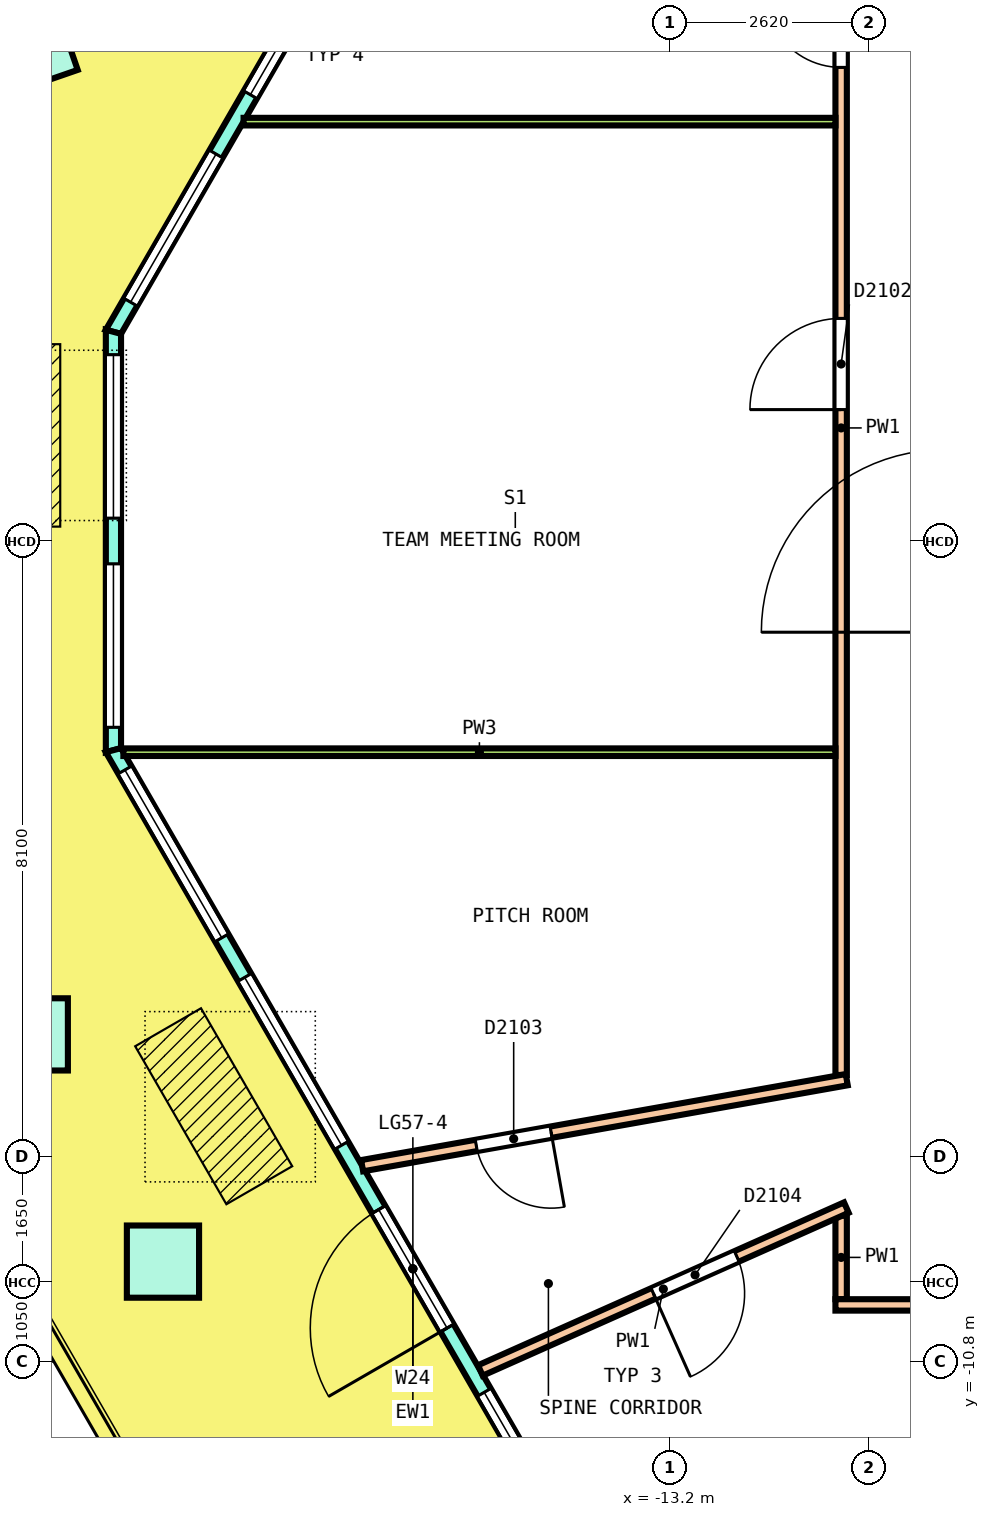
"""IFC4 building model, lengths in metres.
Left out: names, types, materials, properties, quantities, classifications, styles, units other than length and angle.
Written with IfcOpenShell. Run it as: python <this file> out.ifc"""

import sys

from ifc_helpers import new_model, si_unit, direction, frame, frame_2d, origin, origin_2d, place, context, subcontext, project, spatial, polyline, rectangle, outline, extrude, element, fill, save


model = new_model("IFC4")
c1 = context("Model", 3, precision=1e-05, world=origin(), true_north=direction((0.0, 1.0)))
c2 = subcontext(c1, "Body", "Model", "MODEL_VIEW")
j1 = project(units=[si_unit("LENGTHUNIT", "METRE"), si_unit("PLANEANGLEUNIT", "RADIAN")], contexts=[c1])
p1 = place(None, origin())
s1 = spatial("IfcSite", under=j1, at=p1, CompositionType="ELEMENT")
p2 = place(p1, origin())
s2 = spatial("IfcBuilding", under=s1, at=p2, CompositionType="ELEMENT")
p3 = place(p2, frame((0.0, 0.0, 263.0)))
s3 = spatial("IfcBuildingStorey", under=s2, at=p3, CompositionType="ELEMENT", Elevation=263.0)
p4 = place(p3, frame((-21.598, 6.491, 0.0), z_axis=(-0.021793949015, 0.025136579231, 0.999446434868), x_axis=(-0.500091550798, -0.865904279016, 0.010872920625)))
e1 = element("IfcColumn", 1, at=p4, inside=s3, PredefinedType="COLUMN", context=c2, shape_type="SweptSolid", body=[
    extrude(rectangle(XDim=0.95, YDim=0.95, at=origin_2d()), origin(), (0.0, 0.0, 1.0), 3.652),
])
p5 = place(p3, frame((-21.598, -6.491, 0.0), z_axis=(-0.010900423214, 0.018858400897, 0.999762742599), x_axis=(0.500590318805, -0.865410234662, 0.021782067434)))
e2 = element("IfcColumn", 2, at=p5, inside=s3, PredefinedType="COLUMN", context=c2, shape_type="SweptSolid", body=[
    extrude(rectangle(XDim=0.95, YDim=0.95, at=origin_2d()), origin(), (0.0, 0.0, 1.0), 3.651),
])
p6 = place(p3, frame((-19.872, -9.48, 0.0), z_axis=(-0.003611945175, 0.00628746012, 0.999973710503), x_axis=(0.497890394796, -0.867209649664, 0.007251089524)))
e3 = element("IfcColumn", 3, at=p6, inside=s3, PredefinedType="COLUMN", context=c2, shape_type="SweptSolid", body=[
    extrude(rectangle(XDim=0.95, YDim=0.95, at=origin_2d()), origin(), (0.0, 0.0, 1.0), 3.65),
])
p7 = place(p3, frame((-12.645, 16.398, 0.0), z_axis=(0.0, 0.0, 1.0), x_axis=(-0.499993368965, -0.86602923218, 0.0)))
e4 = element("IfcWall", 4, at=p7, inside=s3, PredefinedType="SOLIDWALL", context=c2, shape_type="SweptSolid", body=[
    extrude(outline(polyline([(-0.027, -0.1), (1.027, -0.1), (2.081, -0.1), (3.135, -0.1), (4.189, -0.1), (5.244, -0.1), (6.298, -0.1), (7.352, -0.1), (8.406, -0.1), (9.46, -0.1), (10.514, -0.1), (11.568, -0.1), (12.622, -0.1), (13.676, -0.1), (14.73, -0.1), (15.784, -0.1), (15.731, 0.1), (14.684, 0.1), (13.637, 0.1), (12.59, 0.1), (11.543, 0.1), (10.496, 0.1), (9.449, 0.1), (8.402, 0.1), (7.355, 0.1), (6.308, 0.1), (5.261, 0.1), (4.215, 0.1), (3.168, 0.1), (2.121, 0.1), (1.074, 0.1), (0.027, 0.1), (-0.027, -0.1)])), origin(), (0.0, 0.0, 1.0), 3.7),
])
p8 = place(p7, frame((0.451, 0.0, 0.1)))
e5 = element("IfcOpeningElement", 5, at=p8, cuts=e4, PredefinedType="OPENING", context=c2, shape_type="SweptSolid", body=[
    extrude(rectangle(XDim=2.25, YDim=2.75, at=frame_2d((1.125, 1.375))), frame((0.0, 0.11, 0.0), z_axis=(0.0, -1.0, 0.0), x_axis=(1.0, 0.0, 0.0)), (0.0, 0.0, 1.0), 0.22),
])
p9 = place(p7, frame((3.602, 0.0, 0.1)))
e6 = element("IfcOpeningElement", 6, at=p9, cuts=e4, PredefinedType="OPENING", context=c2, shape_type="SweptSolid", body=[
    extrude(rectangle(XDim=2.25, YDim=2.75, at=frame_2d((1.125, 1.375))), frame((0.0, 0.11, 0.0), z_axis=(0.0, -1.0, 0.0), x_axis=(1.0, 0.0, 0.0)), (0.0, 0.0, 1.0), 0.22),
])
p10 = place(p7, frame((6.979, 0.0, 0.0)))
e7 = element("IfcOpeningElement", 7, at=p10, cuts=e4, PredefinedType="OPENING", context=c2, shape_type="SweptSolid", body=[
    extrude(rectangle(XDim=1.8, YDim=2.4, at=frame_2d((0.9, 1.2))), frame((0.0, 0.11, 0.0), z_axis=(0.0, -1.0, 0.0), x_axis=(1.0, 0.0, 0.0)), (0.0, 0.0, 1.0), 0.22),
])
p11 = place(p7, frame((6.979, 0.0, 2.55)))
e8 = element("IfcOpeningElement", 8, at=p11, cuts=e4, PredefinedType="OPENING", context=c2, shape_type="SweptSolid", body=[
    extrude(rectangle(XDim=1.8, YDim=0.3, at=frame_2d((0.9, 0.15))), frame((0.0, 0.11, 0.0), z_axis=(0.0, -1.0, 0.0), x_axis=(1.0, 0.0, 0.0)), (0.0, 0.0, 1.0), 0.22),
])
p12 = place(p7, frame((9.906, 0.0, 0.1)))
e9 = element("IfcOpeningElement", 9, at=p12, cuts=e4, PredefinedType="OPENING", context=c2, shape_type="SweptSolid", body=[
    extrude(rectangle(XDim=2.25, YDim=2.75, at=frame_2d((1.125, 1.375))), frame((0.0, 0.11, 0.0), z_axis=(0.0, -1.0, 0.0), x_axis=(1.0, 0.0, 0.0)), (0.0, 0.0, 1.0), 0.22),
])
p13 = place(p7, frame((13.057, 0.0, 0.1)))
e10 = element("IfcOpeningElement", 10, at=p13, cuts=e4, PredefinedType="OPENING", context=c2, shape_type="SweptSolid", body=[
    extrude(rectangle(XDim=2.25, YDim=2.75, at=frame_2d((1.125, 1.375))), frame((0.0, 0.11, 0.0), z_axis=(0.0, -1.0, 0.0), x_axis=(1.0, 0.0, 0.0)), (0.0, 0.0, 1.0), 0.22),
])
p14 = place(p3, frame((-20.524, 2.752, 0.0), z_axis=(0.0, 0.0, 1.0), x_axis=(0.0, -1.0, 0.0)))
e11 = element("IfcWall", 11, at=p14, inside=s3, PredefinedType="SOLIDWALL", context=c2, shape_type="SweptSolid", body=[
    extrude(outline(polyline([(-0.027, -0.1), (1.084, -0.1), (2.196, -0.1), (3.307, -0.1), (4.419, -0.1), (5.53, -0.1), (5.477, 0.1), (4.387, 0.1), (3.297, 0.1), (2.207, 0.1), (1.117, 0.1), (0.027, 0.1), (-0.027, -0.1)])), origin(), (0.0, 0.0, 1.0), 3.7),
])
p15 = place(p14, frame((0.301, 0.0, 0.1)))
e12 = element("IfcOpeningElement", 12, at=p15, cuts=e11, PredefinedType="OPENING", context=c2, shape_type="SweptSolid", body=[
    extrude(rectangle(XDim=2.15, YDim=2.75, at=frame_2d((1.075, 1.375))), frame((0.0, 0.11, 0.0), z_axis=(0.0, -1.0, 0.0), x_axis=(1.0, 0.0, 0.0)), (0.0, 0.0, 1.0), 0.22),
])
p16 = place(p14, frame((3.052, 0.0, 0.1)))
e13 = element("IfcOpeningElement", 13, at=p16, cuts=e11, PredefinedType="OPENING", context=c2, shape_type="SweptSolid", body=[
    extrude(rectangle(XDim=2.15, YDim=2.75, at=frame_2d((1.075, 1.375))), frame((0.0, 0.11, 0.0), z_axis=(0.0, -1.0, 0.0), x_axis=(1.0, 0.0, 0.0)), (0.0, 0.0, 1.0), 0.22),
])
p17 = place(p3, frame((-20.524, -2.752, 0.0), z_axis=(0.0, 0.0, 1.0), x_axis=(0.499993368965, -0.86602923218, 0.0)))
e14 = element("IfcWall", 14, at=p17, inside=s3, PredefinedType="SOLIDWALL", context=c2, shape_type="SweptSolid", body=[
    extrude(outline(polyline([(-0.027, -0.1), (1.027, -0.1), (2.081, -0.1), (3.135, -0.1), (4.189, -0.1), (5.244, -0.1), (6.298, -0.1), (7.352, -0.1), (8.406, -0.1), (9.46, -0.1), (10.514, -0.1), (11.568, -0.1), (12.622, -0.1), (13.676, -0.1), (14.73, -0.1), (15.784, -0.1), (15.731, 0.1), (14.684, 0.1), (13.637, 0.1), (12.59, 0.1), (11.543, 0.1), (10.496, 0.1), (9.449, 0.1), (8.402, 0.1), (7.355, 0.1), (6.308, 0.1), (5.261, 0.1), (4.215, 0.1), (3.168, 0.1), (2.121, 0.1), (1.074, 0.1), (0.027, 0.1), (-0.027, -0.1)])), origin(), (0.0, 0.0, 1.0), 3.7),
])
p18 = place(p17, frame((0.301, 0.0, 0.1)))
e15 = element("IfcOpeningElement", 15, at=p18, cuts=e14, PredefinedType="OPENING", context=c2, shape_type="SweptSolid", body=[
    extrude(rectangle(XDim=2.55, YDim=2.75, at=frame_2d((1.275, 1.375))), frame((0.0, 0.11, 0.0), z_axis=(0.0, -1.0, 0.0), x_axis=(1.0, 0.0, 0.0)), (0.0, 0.0, 1.0), 0.22),
])
p19 = place(p17, frame((3.452, 0.0, 0.1)))
e16 = element("IfcOpeningElement", 16, at=p19, cuts=e14, PredefinedType="OPENING", context=c2, shape_type="SweptSolid", body=[
    extrude(rectangle(XDim=2.55, YDim=2.75, at=frame_2d((1.275, 1.375))), frame((0.0, 0.11, 0.0), z_axis=(0.0, -1.0, 0.0), x_axis=(1.0, 0.0, 0.0)), (0.0, 0.0, 1.0), 0.22),
])
p20 = place(p17, frame((6.979, 0.0, 0.0)))
e17 = element("IfcOpeningElement", 17, at=p20, cuts=e14, PredefinedType="OPENING", context=c2, shape_type="SweptSolid", body=[
    extrude(rectangle(XDim=1.8, YDim=2.4, at=frame_2d((0.9, 1.2))), frame((0.0, 0.11, 0.0), z_axis=(0.0, -1.0, 0.0), x_axis=(1.0, 0.0, 0.0)), (0.0, 0.0, 1.0), 0.22),
])
p21 = place(p17, frame((6.979, 0.0, 2.55)))
e18 = element("IfcOpeningElement", 18, at=p21, cuts=e14, PredefinedType="OPENING", context=c2, shape_type="SweptSolid", body=[
    extrude(rectangle(XDim=1.8, YDim=0.3, at=frame_2d((0.9, 0.15))), frame((0.0, 0.11, 0.0), z_axis=(0.0, -1.0, 0.0), x_axis=(1.0, 0.0, 0.0)), (0.0, 0.0, 1.0), 0.22),
])
p22 = place(p17, frame((9.755, 0.0, 0.1)))
e19 = element("IfcOpeningElement", 19, at=p22, cuts=e14, PredefinedType="OPENING", context=c2, shape_type="SweptSolid", body=[
    extrude(rectangle(XDim=2.55, YDim=2.75, at=frame_2d((1.275, 1.375))), frame((0.0, 0.11, 0.0), z_axis=(0.0, -1.0, 0.0), x_axis=(1.0, 0.0, 0.0)), (0.0, 0.0, 1.0), 0.22),
])
p23 = place(p17, frame((12.907, 0.0, 0.1)))
e20 = element("IfcOpeningElement", 20, at=p23, cuts=e14, PredefinedType="OPENING", context=c2, shape_type="SweptSolid", body=[
    extrude(rectangle(XDim=2.55, YDim=2.75, at=frame_2d((1.275, 1.375))), frame((0.0, 0.11, 0.0), z_axis=(0.0, -1.0, 0.0), x_axis=(1.0, 0.0, 0.0)), (0.0, 0.0, 1.0), 0.22),
])
p24 = place(p3, frame((-10.95, -9.975, 0.0), z_axis=(0.0, 0.0, 1.0), x_axis=(0.0, 1.0, 0.0)))
e21 = element("IfcWall", 21, at=p24, inside=s3, PredefinedType="PARTITIONING", context=c2, shape_type="SweptSolid", body=[
    extrude(rectangle(XDim=1.1, YDim=0.15, at=frame_2d((0.55, 0.0))), origin(), (0.0, 0.0, 1.0), 3.7),
])
p25 = place(p3, frame((-10.95, -7.025, 0.0), z_axis=(0.0, 0.0, 1.0), x_axis=(0.0, 1.0, 0.0)))
e22 = element("IfcWall", 22, at=p25, inside=s3, PredefinedType="PARTITIONING", context=c2, shape_type="SweptSolid", body=[
    extrude(rectangle(XDim=17.025, YDim=0.15, at=frame_2d((8.512, 0.0))), origin(), (0.0, 0.0, 1.0), 2.9),
])
p26 = place(p25, frame((13.256, 0.0, 0.0)))
e23 = element("IfcOpeningElement", 23, at=p26, cuts=e22, PredefinedType="OPENING", context=c2, shape_type="SweptSolid", body=[
    extrude(rectangle(XDim=1.0, YDim=2.1, at=frame_2d((0.5, 1.05))), frame((0.0, 0.085, 0.0), z_axis=(0.0, -1.0, 0.0), x_axis=(1.0, 0.0, 0.0)), (0.0, 0.0, 1.0), 0.17),
])
p27 = place(p25, frame((8.754, 0.0, 0.0)))
e24 = element("IfcOpeningElement", 24, at=p27, cuts=e22, PredefinedType="OPENING", context=c2, shape_type="SweptSolid", body=[
    extrude(rectangle(XDim=1.2, YDim=2.1, at=frame_2d((0.6, 1.05))), frame((0.0, 0.085, 0.0), z_axis=(0.0, -1.0, 0.0), x_axis=(1.0, 0.0, 0.0)), (0.0, 0.0, 1.0), 0.17),
])
p28 = place(p3, frame((-11.025, -10.05, 0.0), z_axis=(0.0, 0.0, 1.0), x_axis=(1.0, 0.0, 0.0)))
e25 = element("IfcWall", 25, at=p28, inside=s3, PredefinedType="PARTITIONING", context=c2, shape_type="SweptSolid", body=[
    extrude(rectangle(XDim=21.925, YDim=0.15, at=frame_2d((10.962, 0.0))), origin(), (0.0, 0.0, 1.0), 2.9),
])
p29 = place(p28, frame((6.125, 0.0, 0.0)))
e26 = element("IfcOpeningElement", 26, at=p29, cuts=e25, PredefinedType="OPENING", context=c2, shape_type="SweptSolid", body=[
    extrude(rectangle(XDim=1.2, YDim=2.1, at=frame_2d((0.6, 1.05))), frame((0.0, 0.085, 0.0), z_axis=(0.0, -1.0, 0.0), x_axis=(1.0, 0.0, 0.0)), (0.0, 0.0, 1.0), 0.17),
])
p30 = place(p28, frame((14.664, 0.0, 0.0)))
e27 = element("IfcOpeningElement", 27, at=p30, cuts=e25, PredefinedType="OPENING", context=c2, shape_type="SweptSolid", body=[
    extrude(rectangle(XDim=1.2, YDim=2.1, at=frame_2d((0.6, 1.05))), frame((0.0, 0.085, 0.0), z_axis=(0.0, -1.0, 0.0), x_axis=(1.0, 0.0, 0.0)), (0.0, 0.0, 1.0), 0.17),
])
p31 = place(p3, frame((-17.252, -8.219, 0.0), z_axis=(0.0, 0.0, 1.0), x_axis=(0.98461343261, 0.174746640379, 0.0)))
e28 = element("IfcWall", 28, at=p31, inside=s3, PredefinedType="PARTITIONING", context=c2, shape_type="SweptSolid", body=[
    extrude(rectangle(XDim=6.476, YDim=0.15, at=frame_2d((3.238, 0.0))), origin(), (0.0, 0.0, 1.0), 2.9),
])
p32 = place(p31, frame((1.525, 0.0, 0.0)))
e29 = element("IfcOpeningElement", 29, at=p32, cuts=e28, PredefinedType="OPENING", context=c2, shape_type="SweptSolid", body=[
    extrude(rectangle(XDim=1.0, YDim=2.1, at=frame_2d((0.5, 1.05))), frame((0.0, 0.085, 0.0), z_axis=(0.0, -1.0, 0.0), x_axis=(1.0, 0.0, 0.0)), (0.0, 0.0, 1.0), 0.17),
])
p33 = place(p3, frame((-15.697, -10.913, 0.0), z_axis=(0.0, 0.0, 1.0), x_axis=(0.913601307638, 0.406611178748, 0.0)))
e30 = element("IfcWall", 30, at=p33, inside=s3, PredefinedType="PARTITIONING", context=c2, shape_type="SweptSolid", body=[
    extrude(rectangle(XDim=5.271, YDim=0.15, at=frame_2d((2.635, 0.0))), origin(), (0.0, 0.0, 1.0), 2.9),
])
p34 = place(p33, frame((2.492, 0.0, 0.0)))
e31 = element("IfcOpeningElement", 31, at=p34, cuts=e30, PredefinedType="OPENING", context=c2, shape_type="SweptSolid", body=[
    extrude(rectangle(XDim=1.2, YDim=2.1, at=frame_2d((0.6, 1.05))), frame((0.0, 0.085, 0.0), z_axis=(0.0, -1.0, 0.0), x_axis=(1.0, 0.0, 0.0)), (0.0, 0.0, 1.0), 0.17),
])
p35 = place(p3, frame((-18.812, 5.517, 0.0), z_axis=(0.0, 0.0, 1.0), x_axis=(1.0, 0.0, 0.0)))
e32 = element("IfcWall", 32, at=p35, inside=s3, PredefinedType="PARTITIONING", context=c2, shape_type="SweptSolid", body=[
    extrude(rectangle(XDim=7.787, YDim=0.1, at=frame_2d((3.894, 0.0))), origin(), (0.0, 0.0, 1.0), 2.9),
])
p36 = place(p3, frame((-20.393, -2.779, 0.0), z_axis=(0.0, 0.0, 1.0), x_axis=(1.0, 0.0, 0.0)))
e33 = element("IfcWall", 33, at=p36, inside=s3, PredefinedType="PARTITIONING", context=c2, shape_type="SweptSolid", body=[
    extrude(rectangle(XDim=9.368, YDim=0.1, at=frame_2d((4.684, 0.0))), origin(), (0.0, 0.0, 1.0), 2.9),
])
p37 = place(p12, origin())
e34 = element("IfcWindow", 34, at=p37, inside=s3, PartitioningType="SINGLE_PANEL", PredefinedType="WINDOW", context=c2, shape_type="SweptSolid", body=[
    extrude(rectangle(XDim=2.25, YDim=2.75, at=frame_2d((1.125, 1.375))), frame((0.0, 0.03, 0.0), z_axis=(0.0, -1.0, 0.0), x_axis=(1.0, 0.0, 0.0)), (0.0, 0.0, 1.0), 0.06),
])
fill(e9, e34)
p38 = place(p13, origin())
e35 = element("IfcWindow", 35, at=p38, inside=s3, PartitioningType="SINGLE_PANEL", PredefinedType="WINDOW", context=c2, shape_type="SweptSolid", body=[
    extrude(rectangle(XDim=2.25, YDim=2.75, at=frame_2d((1.125, 1.375))), frame((0.0, 0.03, 0.0), z_axis=(0.0, -1.0, 0.0), x_axis=(1.0, 0.0, 0.0)), (0.0, 0.0, 1.0), 0.06),
])
fill(e10, e35)
p39 = place(p15, origin())
e36 = element("IfcWindow", 36, at=p39, inside=s3, PartitioningType="SINGLE_PANEL", PredefinedType="WINDOW", context=c2, shape_type="SweptSolid", body=[
    extrude(rectangle(XDim=2.15, YDim=2.75, at=frame_2d((1.075, 1.375))), frame((0.0, 0.03, 0.0), z_axis=(0.0, -1.0, 0.0), x_axis=(1.0, 0.0, 0.0)), (0.0, 0.0, 1.0), 0.06),
])
fill(e12, e36)
p40 = place(p16, origin())
e37 = element("IfcWindow", 37, at=p40, inside=s3, PartitioningType="SINGLE_PANEL", PredefinedType="WINDOW", context=c2, shape_type="SweptSolid", body=[
    extrude(rectangle(XDim=2.15, YDim=2.75, at=frame_2d((1.075, 1.375))), frame((0.0, 0.03, 0.0), z_axis=(0.0, -1.0, 0.0), x_axis=(1.0, 0.0, 0.0)), (0.0, 0.0, 1.0), 0.06),
])
fill(e13, e37)
p41 = place(p18, origin())
e38 = element("IfcWindow", 38, at=p41, inside=s3, PartitioningType="SINGLE_PANEL", PredefinedType="WINDOW", context=c2, shape_type="SweptSolid", body=[
    extrude(rectangle(XDim=2.55, YDim=2.75, at=frame_2d((1.275, 1.375))), frame((0.0, 0.03, 0.0), z_axis=(0.0, -1.0, 0.0), x_axis=(1.0, 0.0, 0.0)), (0.0, 0.0, 1.0), 0.06),
])
fill(e15, e38)
p42 = place(p19, origin())
e39 = element("IfcWindow", 39, at=p42, inside=s3, PartitioningType="SINGLE_PANEL", PredefinedType="WINDOW", context=c2, shape_type="SweptSolid", body=[
    extrude(rectangle(XDim=2.55, YDim=2.75, at=frame_2d((1.275, 1.375))), frame((0.0, 0.03, 0.0), z_axis=(0.0, -1.0, 0.0), x_axis=(1.0, 0.0, 0.0)), (0.0, 0.0, 1.0), 0.06),
])
fill(e16, e39)
p43 = place(p20, origin())
e40 = element("IfcDoor", 40, at=p43, inside=s3, OperationType="DOUBLE_DOOR_SINGLE_SWING", PredefinedType="DOOR", context=c2, shape_type="SweptSolid", body=[
    extrude(rectangle(XDim=1.8, YDim=2.4, at=frame_2d((0.9, 1.2))), frame((0.0, 0.025, 0.0), z_axis=(0.0, -1.0, 0.0), x_axis=(1.0, 0.0, 0.0)), (0.0, 0.0, 1.0), 0.05),
])
fill(e17, e40)
p44 = place(p21, origin())
e41 = element("IfcWindow", 41, at=p44, inside=s3, PartitioningType="SINGLE_PANEL", PredefinedType="WINDOW", context=c2, shape_type="SweptSolid", body=[
    extrude(rectangle(XDim=1.8, YDim=0.3, at=frame_2d((0.9, 0.15))), frame((0.0, 0.03, 0.0), z_axis=(0.0, -1.0, 0.0), x_axis=(1.0, 0.0, 0.0)), (0.0, 0.0, 1.0), 0.06),
])
fill(e18, e41)
p45 = place(p22, origin())
e42 = element("IfcWindow", 42, at=p45, inside=s3, PartitioningType="SINGLE_PANEL", PredefinedType="WINDOW", context=c2, shape_type="SweptSolid", body=[
    extrude(rectangle(XDim=2.55, YDim=2.75, at=frame_2d((1.275, 1.375))), frame((0.0, 0.03, 0.0), z_axis=(0.0, -1.0, 0.0), x_axis=(1.0, 0.0, 0.0)), (0.0, 0.0, 1.0), 0.06),
])
fill(e19, e42)
p46 = place(p26, origin())
e43 = element("IfcDoor", 43, at=p46, inside=s3, OperationType="SINGLE_SWING_LEFT", PredefinedType="DOOR", context=c2, shape_type="SweptSolid", body=[
    extrude(rectangle(XDim=1.0, YDim=2.1, at=frame_2d((0.5, 1.05))), frame((0.0, 0.025, 0.0), z_axis=(0.0, -1.0, 0.0), x_axis=(1.0, 0.0, 0.0)), (0.0, 0.0, 1.0), 0.05),
])
fill(e23, e43)
p47 = place(p27, origin())
e44 = element("IfcDoor", 44, at=p47, inside=s3, OperationType="DOUBLE_DOOR_SINGLE_SWING", PredefinedType="DOOR", context=c2, shape_type="SweptSolid", body=[
    extrude(rectangle(XDim=1.2, YDim=2.1, at=frame_2d((0.6, 1.05))), frame((0.0, 0.025, 0.0), z_axis=(0.0, -1.0, 0.0), x_axis=(1.0, 0.0, 0.0)), (0.0, 0.0, 1.0), 0.05),
])
fill(e24, e44)
p48 = place(p32, origin())
e45 = element("IfcDoor", 45, at=p48, inside=s3, OperationType="SINGLE_SWING_RIGHT", PredefinedType="DOOR", context=c2, shape_type="SweptSolid", body=[
    extrude(rectangle(XDim=1.0, YDim=2.1, at=frame_2d((0.5, 1.05))), frame((0.0, 0.025, 0.0), z_axis=(0.0, -1.0, 0.0), x_axis=(1.0, 0.0, 0.0)), (0.0, 0.0, 1.0), 0.05),
])
fill(e29, e45)
p49 = place(p34, origin())
e46 = element("IfcDoor", 46, at=p49, inside=s3, OperationType="DOUBLE_DOOR_SINGLE_SWING", PredefinedType="DOOR", context=c2, shape_type="SweptSolid", body=[
    extrude(rectangle(XDim=1.2, YDim=2.1, at=frame_2d((0.6, 1.05))), frame((0.0, 0.025, 0.0), z_axis=(0.0, -1.0, 0.0), x_axis=(1.0, 0.0, 0.0)), (0.0, 0.0, 1.0), 0.05),
])
fill(e31, e46)
save(model, sys.argv[1])
